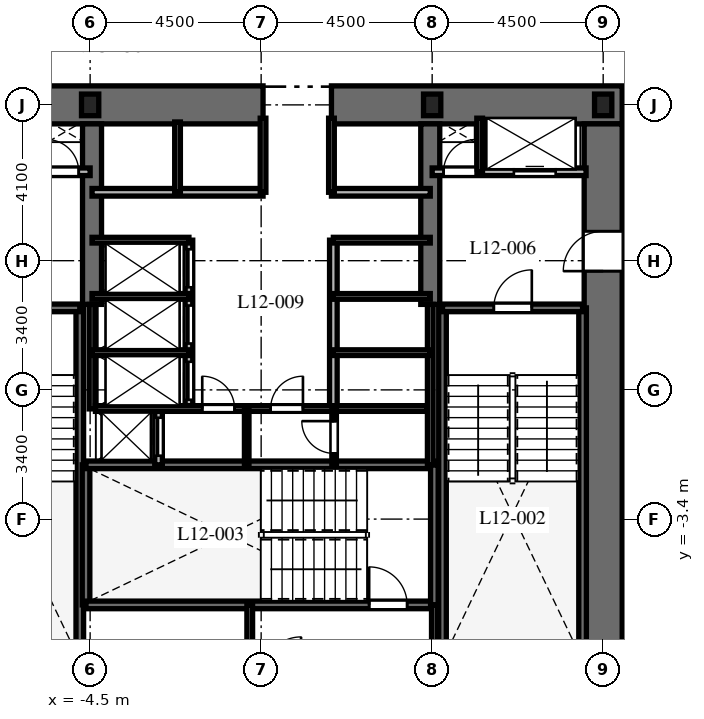
"""IFC4 building model, lengths in metres.
Left out: names, types, materials, properties, quantities, classifications, styles, units other than length and angle.
Written with IfcOpenShell. Run it as: python <this file> out.ifc"""

import sys

from ifc_helpers import new_model, si_unit, direction, frame, frame_2d, origin, origin_2d, place, context, subcontext, project, spatial, rectangle, i_section, extrude, element, fill, save


model = new_model("IFC4")
c1 = context("Model", 3, precision=1e-05, world=origin(), true_north=direction((0.0, 1.0)))
c2 = subcontext(c1, "Body", "Model", "MODEL_VIEW")
j1 = project(units=[si_unit("LENGTHUNIT", "METRE"), si_unit("PLANEANGLEUNIT", "RADIAN")], contexts=[c1])
p1 = place(None, origin())
s1 = spatial("IfcSite", under=j1, at=p1, CompositionType="ELEMENT")
p2 = place(p1, origin())
s2 = spatial("IfcBuilding", under=s1, at=p2, CompositionType="ELEMENT")
p3 = place(p2, frame((0.0, 0.0, 56.4)))
s3 = spatial("IfcBuildingStorey", under=s2, at=p3, CompositionType="ELEMENT", Elevation=56.4)
p4 = place(p3, frame((-9.5, 7.5, 0.0), z_axis=(0.0, 0.0, 1.0), x_axis=(1.0, 0.0, 0.0)))
e1 = element("IfcWall", 1, at=p4, inside=s3, PredefinedType="SHEAR", context=c2, shape_type="SweptSolid", body=[
    extrude(rectangle(XDim=9.55, YDim=1.0, at=frame_2d((4.775, 0.0))), origin(), (0.0, 0.0, 1.0), 3.7),
])
p5 = place(p3, frame((1.85, 7.5, 0.0), z_axis=(0.0, 0.0, 1.0), x_axis=(1.0, 0.0, 0.0)))
e2 = element("IfcWall", 2, at=p5, inside=s3, PredefinedType="SHEAR", context=c2, shape_type="SweptSolid", body=[
    extrude(rectangle(XDim=7.65, YDim=1.0, at=frame_2d((3.825, 0.0))), origin(), (0.0, 0.0, 1.0), 3.7),
])
p6 = place(p3, frame((9.0, -7.0, 0.0), z_axis=(0.0, 0.0, 1.0), x_axis=(0.0, 1.0, 0.0)))
e3 = element("IfcWall", 3, at=p6, inside=s3, PredefinedType="SHEAR", context=c2, shape_type="SweptSolid", body=[
    extrude(rectangle(XDim=14.0, YDim=1.0, at=frame_2d((7.0, 0.0))), origin(), (0.0, 0.0, 1.0), 3.7),
])
p7 = place(p6, frame((10.125, 0.0, 0.0)))
e4 = element("IfcOpeningElement", 4, at=p7, cuts=e3, PredefinedType="OPENING", context=c2, shape_type="SweptSolid", body=[
    extrude(rectangle(XDim=1.05, YDim=2.15, at=frame_2d((0.525, 1.075))), frame((0.0, 0.51, 0.0), z_axis=(0.0, -1.0, 0.0), x_axis=(1.0, 0.0, 0.0)), (0.0, 0.0, 1.0), 1.02),
])
for number, where, z_axis, x_axis in (
    (5, (-4.45, 2.25, 0.0), (0.0, 0.0, 1.0), (0.0, 1.0, 0.0)),
    (6, (4.45, 2.25, 0.0), (0.0, 0.0, 1.0), (0.0, 1.0, 0.0)),
):
    element("IfcWall", number, at=place(p3, frame(where, z_axis=z_axis, x_axis=x_axis)), inside=s3, PredefinedType="SHEAR", context=c2, shape_type="SweptSolid", body=[
        extrude(rectangle(XDim=4.75, YDim=0.5, at=frame_2d((2.375, 0.0))), origin(), (0.0, 0.0, 1.0), 3.7),
    ])
p8 = place(p3, frame((-4.772, -6.985, 0.0), z_axis=(0.0, 0.0, 1.0), x_axis=(0.0, 1.0, 0.0)))
e7 = element("IfcWall", 7, at=p8, inside=s3, PredefinedType="SHEAR", context=c2, shape_type="SweptSolid", body=[
    extrude(rectangle(XDim=9.143, YDim=0.2, at=frame_2d((4.572, 0.0))), origin(), (0.0, 0.0, 1.0), 3.7),
])
p9 = place(p3, frame((-8.458, 2.158, 0.0), z_axis=(0.0, 0.0, 1.0), x_axis=(1.0, 0.0, 0.0)))
e8 = element("IfcWall", 8, at=p9, inside=s3, PredefinedType="SHEAR", context=c2, shape_type="SweptSolid", body=[
    extrude(rectangle(XDim=3.686, YDim=0.2, at=frame_2d((1.843, 0.0))), origin(), (0.0, 0.0, 1.0), 3.7),
])
p10 = place(p9, frame((1.3, 0.0, 0.0)))
e9 = element("IfcOpeningElement", 9, at=p10, cuts=e8, PredefinedType="OPENING", context=c2, shape_type="SweptSolid", body=[
    extrude(rectangle(XDim=1.0, YDim=2.15, at=frame_2d((0.5, 1.075))), frame((0.0, 0.11, 0.0), z_axis=(0.0, -1.0, 0.0), x_axis=(1.0, 0.0, 0.0)), (0.0, 0.0, 1.0), 0.22),
])
for number, where, z_axis, x_axis in (
    (10, (4.772, -6.985, 0.0), (0.0, 0.0, 1.0), (0.0, 1.0, 0.0)),
    (11, (8.458, -6.985, 0.0), (0.0, 0.0, 1.0), (0.0, 1.0, 0.0)),
):
    element("IfcWall", number, at=place(p3, frame(where, z_axis=z_axis, x_axis=x_axis)), inside=s3, PredefinedType="SHEAR", context=c2, shape_type="SweptSolid", body=[
        extrude(rectangle(XDim=9.143, YDim=0.2, at=frame_2d((4.572, 0.0))), origin(), (0.0, 0.0, 1.0), 3.7),
    ])
p11 = place(p3, frame((4.772, 2.158, 0.0), z_axis=(0.0, 0.0, 1.0), x_axis=(1.0, 0.0, 0.0)))
e12 = element("IfcWall", 12, at=p11, inside=s3, PredefinedType="SHEAR", context=c2, shape_type="SweptSolid", body=[
    extrude(rectangle(XDim=3.686, YDim=0.2, at=frame_2d((1.843, 0.0))), origin(), (0.0, 0.0, 1.0), 3.7),
])
p12 = place(p11, frame((1.35, 0.0, 0.0)))
e13 = element("IfcOpeningElement", 13, at=p12, cuts=e12, PredefinedType="OPENING", context=c2, shape_type="SweptSolid", body=[
    extrude(rectangle(XDim=1.0, YDim=2.15, at=frame_2d((0.5, 1.075))), frame((0.0, 0.11, 0.0), z_axis=(0.0, -1.0, 0.0), x_axis=(1.0, 0.0, 0.0)), (0.0, 0.0, 1.0), 0.22),
])
p13 = place(p3, frame((-4.608, -5.658, 0.0), z_axis=(0.0, 0.0, 1.0), x_axis=(0.0, 1.0, 0.0)))
e14 = element("IfcWall", 14, at=p13, inside=s3, PredefinedType="SHEAR", context=c2, shape_type="SweptSolid", body=[
    extrude(rectangle(XDim=3.686, YDim=0.2, at=frame_2d((1.843, 0.0))), origin(), (0.0, 0.0, 1.0), 3.7),
])
p14 = place(p3, frame((-4.608, -5.658, 0.0), z_axis=(0.0, 0.0, 1.0), x_axis=(1.0, 0.0, 0.0)))
e15 = element("IfcWall", 15, at=p14, inside=s3, PredefinedType="SHEAR", context=c2, shape_type="SweptSolid", body=[
    extrude(rectangle(XDim=9.166, YDim=0.2, at=frame_2d((4.583, 0.0))), origin(), (0.0, 0.0, 1.0), 3.7),
])
p15 = place(p14, frame((7.45, 0.0, 0.0)))
e16 = element("IfcOpeningElement", 16, at=p15, cuts=e15, PredefinedType="OPENING", context=c2, shape_type="SweptSolid", body=[
    extrude(rectangle(XDim=1.0, YDim=2.15, at=frame_2d((0.5, 1.075))), frame((0.0, 0.11, 0.0), z_axis=(0.0, -1.0, 0.0), x_axis=(1.0, 0.0, 0.0)), (0.0, 0.0, 1.0), 0.22),
])
p16 = place(p3, frame((-4.608, -1.972, 0.0), z_axis=(0.0, 0.0, 1.0), x_axis=(1.0, 0.0, 0.0)))
e17 = element("IfcWall", 17, at=p16, inside=s3, PredefinedType="SHEAR", context=c2, shape_type="SweptSolid", body=[
    extrude(rectangle(XDim=9.166, YDim=0.2, at=frame_2d((4.583, 0.0))), origin(), (0.0, 0.0, 1.0), 3.7),
])
p17 = place(p3, frame((4.558, -5.658, 0.0), z_axis=(0.0, 0.0, 1.0), x_axis=(0.0, 1.0, 0.0)))
e18 = element("IfcWall", 18, at=p17, inside=s3, PredefinedType="SHEAR", context=c2, shape_type="SweptSolid", body=[
    extrude(rectangle(XDim=3.686, YDim=0.2, at=frame_2d((1.843, 0.0))), origin(), (0.0, 0.0, 1.0), 3.7),
])
for number, where, z_axis, x_axis in (
    (19, (9.0, 7.5, 0.0), (0.0, 0.0, 1.0), (1.0, 0.0, 0.0)),
    (20, (4.5, 7.5, 0.0), (0.0, 0.0, 1.0), (1.0, 0.0, 0.0)),
    (21, (-4.5, 7.5, 0.0), (0.0, 0.0, 1.0), (1.0, 0.0, 0.0)),
):
    element("IfcColumn", number, at=place(p3, frame(where, z_axis=z_axis, x_axis=x_axis)), inside=s3, PredefinedType="COLUMN", context=c2, shape_type="SweptSolid", body=[
        extrude(i_section(OverallWidth=0.454, OverallDepth=0.569, WebThickness=0.078, FlangeThickness=0.125, at=origin_2d()), origin(), (0.0, 0.0, 1.0), 3.7),
    ])
for number, where, z_axis, x_axis in (
    (22, (-0.3, -7.02, 0.0), (0.0, 0.0, 1.0), (0.0, 1.0, 0.0)),
    (23, (4.558, -7.02, 0.0), (0.0, 0.0, 1.0), (0.0, 1.0, 0.0)),
):
    element("IfcWall", number, at=place(p3, frame(where, z_axis=z_axis, x_axis=x_axis)), inside=s3, PredefinedType="PARTITIONING", context=c2, shape_type="SweptSolid", body=[
        extrude(rectangle(XDim=1.362, YDim=0.15, at=frame_2d((0.681, 0.0))), origin(), (0.0, 0.0, 1.0), 3.4),
    ])
p18 = place(p3, frame((-8.55, 5.74, 0.0), z_axis=(0.0, 0.0, 1.0), x_axis=(1.0, 0.0, 0.0)))
e24 = element("IfcWall", 24, at=p18, inside=s3, PredefinedType="PARTITIONING", context=c2, shape_type="SweptSolid", body=[
    extrude(rectangle(XDim=4.05, YDim=0.2, at=frame_2d((2.025, 0.0))), origin(), (0.0, 0.0, 1.0), 3.4),
])
p19 = place(p18, frame((0.75, 0.0, 0.0)))
e25 = element("IfcOpeningElement", 25, at=p19, cuts=e24, PredefinedType="OPENING", context=c2, shape_type="SweptSolid", body=[
    extrude(rectangle(XDim=1.1, YDim=2.2, at=frame_2d((0.55, 1.1))), frame((0.0, 0.11, 0.0), z_axis=(0.0, -1.0, 0.0), x_axis=(1.0, 0.0, 0.0)), (0.0, 0.0, 1.0), 0.22),
])
p20 = place(p18, frame((2.9, 0.0, 0.0)))
e26 = element("IfcOpeningElement", 26, at=p20, cuts=e24, PredefinedType="OPENING", context=c2, shape_type="SweptSolid", body=[
    extrude(rectangle(XDim=0.85, YDim=2.03, at=frame_2d((0.425, 1.015))), frame((0.0, 0.11, 0.0), z_axis=(0.0, -1.0, 0.0), x_axis=(1.0, 0.0, 0.0)), (0.0, 0.0, 1.0), 0.22),
])
p21 = place(p3, frame((4.5, 5.74, 0.0), z_axis=(0.0, 0.0, 1.0), x_axis=(1.0, 0.0, 0.0)))
e27 = element("IfcWall", 27, at=p21, inside=s3, PredefinedType="PARTITIONING", context=c2, shape_type="SweptSolid", body=[
    extrude(rectangle(XDim=4.05, YDim=0.2, at=frame_2d((2.025, 0.0))), origin(), (0.0, 0.0, 1.0), 3.4),
])
p22 = place(p21, frame((0.3, 0.0, 0.0)))
e28 = element("IfcOpeningElement", 28, at=p22, cuts=e27, PredefinedType="OPENING", context=c2, shape_type="SweptSolid", body=[
    extrude(rectangle(XDim=0.85, YDim=2.03, at=frame_2d((0.425, 1.015))), frame((0.0, 0.11, 0.0), z_axis=(0.0, -1.0, 0.0), x_axis=(1.0, 0.0, 0.0)), (0.0, 0.0, 1.0), 0.22),
])
p23 = place(p21, frame((2.15, 0.0, 0.0)))
e29 = element("IfcOpeningElement", 29, at=p23, cuts=e27, PredefinedType="OPENING", context=c2, shape_type="SweptSolid", body=[
    extrude(rectangle(XDim=1.1, YDim=2.2, at=frame_2d((0.55, 1.1))), frame((0.0, 0.11, 0.0), z_axis=(0.0, -1.0, 0.0), x_axis=(1.0, 0.0, 0.0)), (0.0, 0.0, 1.0), 0.22),
])
p24 = place(p3, frame((5.75, 5.74, 0.0), z_axis=(0.0, 0.0, 1.0), x_axis=(0.0, 1.0, 0.0)))
e30 = element("IfcWall", 30, at=p24, inside=s3, PredefinedType="PARTITIONING", context=c2, shape_type="SweptSolid", body=[
    extrude(rectangle(XDim=1.41, YDim=0.15, at=frame_2d((0.705, 0.0))), origin(), (0.0, 0.0, 1.0), 3.4),
])
p25 = place(p3, frame((-2.7, -1.972, 0.0), z_axis=(0.0, 0.0, 1.0), x_axis=(0.0, 1.0, 0.0)))
e31 = element("IfcWall", 31, at=p25, inside=s3, PredefinedType="PARTITIONING", context=c2, shape_type="SweptSolid", body=[
    extrude(rectangle(XDim=1.472, YDim=0.2, at=frame_2d((0.736, 0.0))), origin(), (0.0, 0.0, 1.0), 3.4),
])
p26 = place(p25, frame((0.24, 0.0, 0.0)))
e32 = element("IfcOpeningElement", 32, at=p26, cuts=e31, PredefinedType="OPENING", context=c2, shape_type="SweptSolid", body=[
    extrude(rectangle(XDim=1.0, YDim=2.2, at=frame_2d((0.5, 1.1))), frame((0.0, 0.11, 0.0), z_axis=(0.0, -1.0, 0.0), x_axis=(1.0, 0.0, 0.0)), (0.0, 0.0, 1.0), 0.22),
])
p27 = place(p3, frame((-4.45, 5.2, 0.0), z_axis=(0.0, 0.0, 1.0), x_axis=(1.0, 0.0, 0.0)))
e33 = element("IfcWall", 33, at=p27, inside=s3, PredefinedType="PARTITIONING", context=c2, shape_type="SweptSolid", body=[
    extrude(rectangle(XDim=4.5, YDim=0.2, at=frame_2d((2.25, 0.0))), origin(), (0.0, 0.0, 1.0), 3.4),
])
p28 = place(p3, frame((1.85, 5.2, 0.0), z_axis=(0.0, 0.0, 1.0), x_axis=(1.0, 0.0, 0.0)))
e34 = element("IfcWall", 34, at=p28, inside=s3, PredefinedType="PARTITIONING", context=c2, shape_type="SweptSolid", body=[
    extrude(rectangle(XDim=2.6, YDim=0.2, at=frame_2d((1.3, 0.0))), origin(), (0.0, 0.0, 1.0), 3.4),
])
p29 = place(p3, frame((-2.2, 5.2, 0.0), z_axis=(0.0, 0.0, 1.0), x_axis=(0.0, 1.0, 0.0)))
e35 = element("IfcWall", 35, at=p29, inside=s3, PredefinedType="PARTITIONING", context=c2, shape_type="SweptSolid", body=[
    extrude(rectangle(XDim=1.85, YDim=0.15, at=frame_2d((0.925, 0.0))), origin(), (0.0, 0.0, 1.0), 3.4),
])
for number, where, z_axis, x_axis in (
    (36, (0.05, 5.2, 0.0), (0.0, 0.0, 1.0), (0.0, 1.0, 0.0)),
    (37, (1.85, 5.2, 0.0), (0.0, 0.0, 1.0), (0.0, 1.0, 0.0)),
):
    element("IfcWall", number, at=place(p3, frame(where, z_axis=z_axis, x_axis=x_axis)), inside=s3, PredefinedType="PARTITIONING", context=c2, shape_type="SweptSolid", body=[
        extrude(rectangle(XDim=1.95, YDim=0.15, at=frame_2d((0.975, 0.0))), origin(), (0.0, 0.0, 1.0), 3.4),
    ])
p30 = place(p3, frame((-4.45, -0.5, 0.0), z_axis=(0.0, 0.0, 1.0), x_axis=(0.0, 1.0, 0.0)))
e38 = element("IfcWall", 38, at=p30, inside=s3, PredefinedType="PARTITIONING", context=c2, shape_type="SweptSolid", body=[
    extrude(rectangle(XDim=2.75, YDim=0.15, at=frame_2d((1.375, 0.0))), origin(), (0.0, 0.0, 1.0), 3.4),
])
p31 = place(p3, frame((4.45, -1.972, 0.0), z_axis=(0.0, 0.0, 1.0), x_axis=(0.0, 1.0, 0.0)))
e39 = element("IfcWall", 39, at=p31, inside=s3, PredefinedType="PARTITIONING", context=c2, shape_type="SweptSolid", body=[
    extrude(rectangle(XDim=4.222, YDim=0.15, at=frame_2d((2.111, 0.0))), origin(), (0.0, 0.0, 1.0), 3.4),
])
p32 = place(p3, frame((-1.9, -0.5, 0.0), z_axis=(0.0, 0.0, 1.0), x_axis=(0.0, 1.0, 0.0)))
e40 = element("IfcWall", 40, at=p32, inside=s3, PredefinedType="PARTITIONING", context=c2, shape_type="SweptSolid", body=[
    extrude(rectangle(XDim=4.44, YDim=0.2, at=frame_2d((2.22, 0.0))), origin(), (0.0, 0.0, 1.0), 3.4),
])
p33 = place(p32, frame((0.24, 0.0, 0.0)))
e41 = element("IfcOpeningElement", 41, at=p33, cuts=e40, PredefinedType="OPENING", context=c2, shape_type="SweptSolid", body=[
    extrude(rectangle(XDim=1.0, YDim=2.2, at=frame_2d((0.5, 1.1))), frame((0.0, 0.11, 0.0), z_axis=(0.0, -1.0, 0.0), x_axis=(1.0, 0.0, 0.0)), (0.0, 0.0, 1.0), 0.22),
])
p34 = place(p32, frame((1.72, 0.0, 0.0)))
e42 = element("IfcOpeningElement", 42, at=p34, cuts=e40, PredefinedType="OPENING", context=c2, shape_type="SweptSolid", body=[
    extrude(rectangle(XDim=1.0, YDim=2.2, at=frame_2d((0.5, 1.1))), frame((0.0, 0.11, 0.0), z_axis=(0.0, -1.0, 0.0), x_axis=(1.0, 0.0, 0.0)), (0.0, 0.0, 1.0), 0.22),
])
p35 = place(p32, frame((3.2, 0.0, 0.0)))
e43 = element("IfcOpeningElement", 43, at=p35, cuts=e40, PredefinedType="OPENING", context=c2, shape_type="SweptSolid", body=[
    extrude(rectangle(XDim=1.0, YDim=2.2, at=frame_2d((0.5, 1.1))), frame((0.0, 0.11, 0.0), z_axis=(0.0, -1.0, 0.0), x_axis=(1.0, 0.0, 0.0)), (0.0, 0.0, 1.0), 0.22),
])
for number, where, z_axis, x_axis in (
    (44, (-4.45, 3.94, 0.0), (0.0, 0.0, 1.0), (1.0, 0.0, 0.0)),
    (45, (-4.45, 0.98, 0.0), (0.0, 0.0, 1.0), (1.0, 0.0, 0.0)),
    (46, (-4.45, 2.46, 0.0), (0.0, 0.0, 1.0), (1.0, 0.0, 0.0)),
):
    element("IfcWall", number, at=place(p3, frame(where, z_axis=z_axis, x_axis=x_axis)), inside=s3, PredefinedType="PARTITIONING", context=c2, shape_type="SweptSolid", body=[
        extrude(rectangle(XDim=2.55, YDim=0.15, at=frame_2d((1.275, 0.0))), origin(), (0.0, 0.0, 1.0), 3.4),
    ])
p36 = place(p3, frame((1.9, -0.5, 0.0), z_axis=(0.0, 0.0, 1.0), x_axis=(0.0, 1.0, 0.0)))
e47 = element("IfcWall", 47, at=p36, inside=s3, PredefinedType="PARTITIONING", context=c2, shape_type="SweptSolid", body=[
    extrude(rectangle(XDim=4.44, YDim=0.2, at=frame_2d((2.22, 0.0))), origin(), (0.0, 0.0, 1.0), 3.4),
])
for number, where, z_axis, x_axis in (
    (48, (1.9, 3.94, 0.0), (0.0, 0.0, 1.0), (1.0, 0.0, 0.0)),
    (49, (1.9, 0.98, 0.0), (0.0, 0.0, 1.0), (1.0, 0.0, 0.0)),
    (50, (1.9, 2.46, 0.0), (0.0, 0.0, 1.0), (1.0, 0.0, 0.0)),
):
    element("IfcWall", number, at=place(p3, frame(where, z_axis=z_axis, x_axis=x_axis)), inside=s3, PredefinedType="PARTITIONING", context=c2, shape_type="SweptSolid", body=[
        extrude(rectangle(XDim=2.55, YDim=0.15, at=frame_2d((1.275, 0.0))), origin(), (0.0, 0.0, 1.0), 3.4),
    ])
p37 = place(p3, frame((-4.36, -0.49, 0.0), z_axis=(0.0, 0.0, 1.0), x_axis=(1.0, 0.0, 0.0)))
e51 = element("IfcWall", 51, at=p37, inside=s3, PredefinedType="PARTITIONING", context=c2, shape_type="SweptSolid", body=[
    extrude(rectangle(XDim=8.72, YDim=0.15, at=frame_2d((4.36, 0.0))), origin(), (0.0, 0.0, 1.0), 3.4),
])
p38 = place(p37, frame((2.81, 0.0, 0.0)))
e52 = element("IfcOpeningElement", 52, at=p38, cuts=e51, PredefinedType="OPENING", context=c2, shape_type="SweptSolid", body=[
    extrude(rectangle(XDim=0.85, YDim=2.03, at=frame_2d((0.425, 1.015))), frame((0.0, 0.085, 0.0), z_axis=(0.0, -1.0, 0.0), x_axis=(1.0, 0.0, 0.0)), (0.0, 0.0, 1.0), 0.17),
])
p39 = place(p37, frame((4.61, 0.0, 0.0)))
e53 = element("IfcOpeningElement", 53, at=p39, cuts=e51, PredefinedType="OPENING", context=c2, shape_type="SweptSolid", body=[
    extrude(rectangle(XDim=0.85, YDim=2.03, at=frame_2d((0.425, 1.015))), frame((0.0, 0.085, 0.0), z_axis=(0.0, -1.0, 0.0), x_axis=(1.0, 0.0, 0.0)), (0.0, 0.0, 1.0), 0.17),
])
p40 = place(p3, frame((-0.38, -1.972, 0.0), z_axis=(0.0, 0.0, 1.0), x_axis=(0.0, 1.0, 0.0)))
e54 = element("IfcWall", 54, at=p40, inside=s3, PredefinedType="PARTITIONING", context=c2, shape_type="SweptSolid", body=[
    extrude(rectangle(XDim=1.472, YDim=0.12, at=frame_2d((0.736, 0.0))), origin(), (0.0, 0.0, 1.0), 3.4),
])
p41 = place(p3, frame((1.92, -1.972, 0.0), z_axis=(0.0, 0.0, 1.0), x_axis=(0.0, 1.0, 0.0)))
e55 = element("IfcWall", 55, at=p41, inside=s3, PredefinedType="PARTITIONING", context=c2, shape_type="SweptSolid", body=[
    extrude(rectangle(XDim=1.472, YDim=0.12, at=frame_2d((0.736, 0.0))), origin(), (0.0, 0.0, 1.0), 3.4),
])
p42 = place(p41, frame((0.3, 0.0, 0.0)))
e56 = element("IfcOpeningElement", 56, at=p42, cuts=e55, PredefinedType="OPENING", context=c2, shape_type="SweptSolid", body=[
    extrude(rectangle(XDim=0.85, YDim=2.03, at=frame_2d((0.425, 1.015))), frame((0.0, 0.07, 0.0), z_axis=(0.0, -1.0, 0.0), x_axis=(1.0, 0.0, 0.0)), (0.0, 0.0, 1.0), 0.14),
])
p43 = place(p12, origin())
e57 = element("IfcDoor", 57, at=p43, inside=s3, OperationType="SINGLE_SWING_RIGHT", PredefinedType="DOOR", context=c2, shape_type="SweptSolid", body=[
    extrude(rectangle(XDim=1.0, YDim=2.15, at=frame_2d((0.5, 1.075))), frame((0.0, 0.025, 0.0), z_axis=(0.0, -1.0, 0.0), x_axis=(1.0, 0.0, 0.0)), (0.0, 0.0, 1.0), 0.05),
])
fill(e13, e57)
p44 = place(p15, origin())
e58 = element("IfcDoor", 58, at=p44, inside=s3, OperationType="SINGLE_SWING_LEFT", PredefinedType="DOOR", context=c2, shape_type="SweptSolid", body=[
    extrude(rectangle(XDim=1.0, YDim=2.15, at=frame_2d((0.5, 1.075))), frame((0.0, 0.025, 0.0), z_axis=(0.0, -1.0, 0.0), x_axis=(1.0, 0.0, 0.0)), (0.0, 0.0, 1.0), 0.05),
])
fill(e16, e58)
p45 = place(p7, origin())
e59 = element("IfcDoor", 59, at=p45, inside=s3, OperationType="SINGLE_SWING_LEFT", PredefinedType="DOOR", context=c2, shape_type="SweptSolid", body=[
    extrude(rectangle(XDim=1.05, YDim=2.15, at=frame_2d((0.525, 1.075))), frame((0.0, 0.025, 0.0), z_axis=(0.0, -1.0, 0.0), x_axis=(1.0, 0.0, 0.0)), (0.0, 0.0, 1.0), 0.05),
])
fill(e4, e59)
p46 = place(p20, origin())
e60 = element("IfcDoor", 60, at=p46, inside=s3, OperationType="SINGLE_SWING_LEFT", PredefinedType="DOOR", context=c2, shape_type="SweptSolid", body=[
    extrude(rectangle(XDim=0.85, YDim=2.03, at=frame_2d((0.425, 1.015))), frame((0.0, 0.025, 0.0), z_axis=(0.0, -1.0, 0.0), x_axis=(1.0, 0.0, 0.0)), (0.0, 0.0, 1.0), 0.05),
])
fill(e26, e60)
p47 = place(p22, origin())
e61 = element("IfcDoor", 61, at=p47, inside=s3, OperationType="SINGLE_SWING_RIGHT", PredefinedType="DOOR", context=c2, shape_type="SweptSolid", body=[
    extrude(rectangle(XDim=0.85, YDim=2.03, at=frame_2d((0.425, 1.015))), frame((0.0, 0.025, 0.0), z_axis=(0.0, -1.0, 0.0), x_axis=(1.0, 0.0, 0.0)), (0.0, 0.0, 1.0), 0.05),
])
fill(e28, e61)
p48 = place(p23, origin())
e62 = element("IfcDoor", 62, at=p48, inside=s3, OperationType="SLIDING_TO_RIGHT", PredefinedType="DOOR", context=c2, shape_type="SweptSolid", body=[
    extrude(rectangle(XDim=1.1, YDim=2.2, at=frame_2d((0.55, 1.1))), frame((0.0, 0.025, 0.0), z_axis=(0.0, -1.0, 0.0), x_axis=(1.0, 0.0, 0.0)), (0.0, 0.0, 1.0), 0.05),
])
fill(e29, e62)
p49 = place(p26, origin())
e63 = element("IfcDoor", 63, at=p49, inside=s3, OperationType="SLIDING_TO_LEFT", PredefinedType="DOOR", context=c2, shape_type="SweptSolid", body=[
    extrude(rectangle(XDim=1.0, YDim=2.2, at=frame_2d((0.5, 1.1))), frame((0.0, 0.025, 0.0), z_axis=(0.0, -1.0, 0.0), x_axis=(1.0, 0.0, 0.0)), (0.0, 0.0, 1.0), 0.05),
])
fill(e32, e63)
p50 = place(p33, origin())
e64 = element("IfcDoor", 64, at=p50, inside=s3, OperationType="SLIDING_TO_LEFT", PredefinedType="DOOR", context=c2, shape_type="SweptSolid", body=[
    extrude(rectangle(XDim=1.0, YDim=2.2, at=frame_2d((0.5, 1.1))), frame((0.0, 0.025, 0.0), z_axis=(0.0, -1.0, 0.0), x_axis=(1.0, 0.0, 0.0)), (0.0, 0.0, 1.0), 0.05),
])
fill(e41, e64)
p51 = place(p34, origin())
e65 = element("IfcDoor", 65, at=p51, inside=s3, OperationType="SLIDING_TO_LEFT", PredefinedType="DOOR", context=c2, shape_type="SweptSolid", body=[
    extrude(rectangle(XDim=1.0, YDim=2.2, at=frame_2d((0.5, 1.1))), frame((0.0, 0.025, 0.0), z_axis=(0.0, -1.0, 0.0), x_axis=(1.0, 0.0, 0.0)), (0.0, 0.0, 1.0), 0.05),
])
fill(e42, e65)
p52 = place(p35, origin())
e66 = element("IfcDoor", 66, at=p52, inside=s3, OperationType="SLIDING_TO_LEFT", PredefinedType="DOOR", context=c2, shape_type="SweptSolid", body=[
    extrude(rectangle(XDim=1.0, YDim=2.2, at=frame_2d((0.5, 1.1))), frame((0.0, 0.025, 0.0), z_axis=(0.0, -1.0, 0.0), x_axis=(1.0, 0.0, 0.0)), (0.0, 0.0, 1.0), 0.05),
])
fill(e43, e66)
p53 = place(p38, origin())
e67 = element("IfcDoor", 67, at=p53, inside=s3, OperationType="SINGLE_SWING_LEFT", PredefinedType="DOOR", context=c2, shape_type="SweptSolid", body=[
    extrude(rectangle(XDim=0.85, YDim=2.03, at=frame_2d((0.425, 1.015))), frame((0.0, 0.025, 0.0), z_axis=(0.0, -1.0, 0.0), x_axis=(1.0, 0.0, 0.0)), (0.0, 0.0, 1.0), 0.05),
])
fill(e52, e67)
p54 = place(p39, origin())
e68 = element("IfcDoor", 68, at=p54, inside=s3, OperationType="SINGLE_SWING_RIGHT", PredefinedType="DOOR", context=c2, shape_type="SweptSolid", body=[
    extrude(rectangle(XDim=0.85, YDim=2.03, at=frame_2d((0.425, 1.015))), frame((0.0, 0.025, 0.0), z_axis=(0.0, -1.0, 0.0), x_axis=(1.0, 0.0, 0.0)), (0.0, 0.0, 1.0), 0.05),
])
fill(e53, e68)
p55 = place(p42, origin())
e69 = element("IfcDoor", 69, at=p55, inside=s3, OperationType="SINGLE_SWING_RIGHT", PredefinedType="DOOR", context=c2, shape_type="SweptSolid", body=[
    extrude(rectangle(XDim=0.85, YDim=2.03, at=frame_2d((0.425, 1.015))), frame((0.0, 0.025, 0.0), z_axis=(0.0, -1.0, 0.0), x_axis=(1.0, 0.0, 0.0)), (0.0, 0.0, 1.0), 0.05),
])
fill(e56, e69)
save(model, sys.argv[1])
